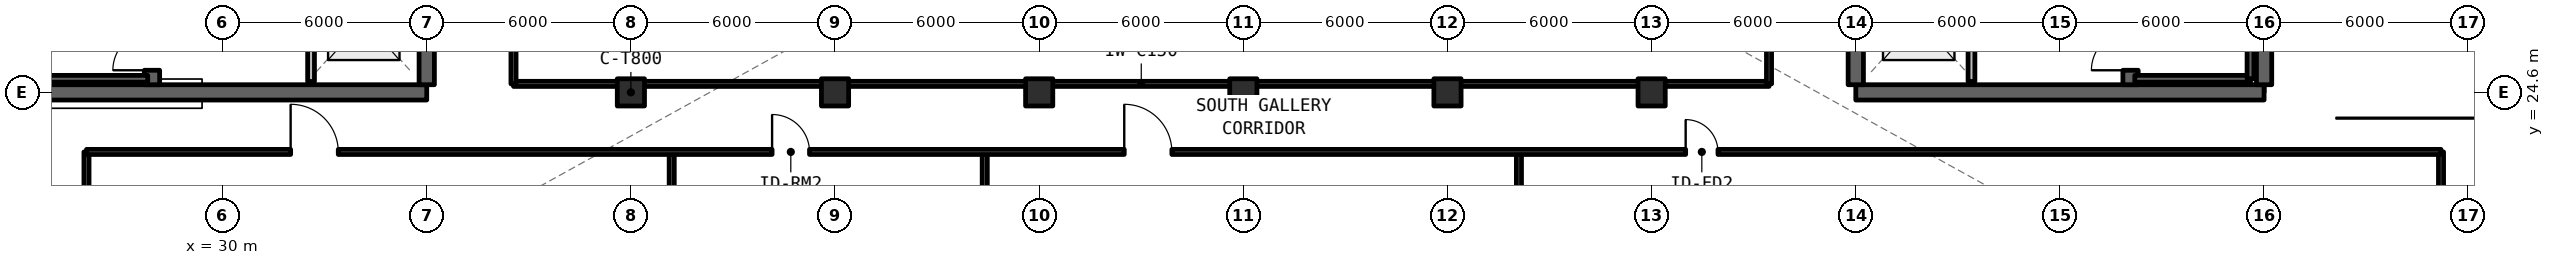
"""IFC4 building model, lengths in metres.
Left out: names, types, materials, properties, quantities, classifications, styles, units other than length and angle.
Written with IfcOpenShell. Run it as: python <this file> out.ifc"""

import sys

from ifc_helpers import new_model, si_unit, direction, frame, frame_2d, origin, origin_2d, place, context, subcontext, project, spatial, rectangle, extrude, element, fill, save


model = new_model("IFC4")
c1 = context("Model", 3, precision=1e-05, world=origin(), true_north=direction((0.0, 1.0)))
c2 = subcontext(c1, "Body", "Model", "MODEL_VIEW")
j1 = project(units=[si_unit("LENGTHUNIT", "METRE"), si_unit("PLANEANGLEUNIT", "RADIAN")], contexts=[c1])
p1 = place(None, origin())
s1 = spatial("IfcSite", under=j1, at=p1, CompositionType="ELEMENT")
p2 = place(p1, origin())
s2 = spatial("IfcBuilding", under=s1, at=p2, CompositionType="ELEMENT")
p3 = place(p2, frame((0.0, 0.0, 177.87)))
s3 = spatial("IfcBuildingStorey", under=s2, at=p3, CompositionType="ELEMENT", Elevation=177.87)
p4 = place(p3, frame((24.0, 24.6, 0.0), z_axis=(0.0, 0.0, 1.0), x_axis=(1.0, 0.0, 0.0)))
e1 = element("IfcWall", 1, at=p4, inside=s3, PredefinedType="SHEAR", context=c2, shape_type="SweptSolid", body=[
    extrude(rectangle(XDim=12.0, YDim=0.45, at=frame_2d((6.0, 0.0))), origin(), (0.0, 0.0, 1.0), 3.96),
])
p5 = place(p3, frame((36.0, 24.825, 0.0), z_axis=(0.0, 0.0, 1.0), x_axis=(0.0, 1.0, 0.0)))
e2 = element("IfcWall", 2, at=p5, inside=s3, PredefinedType="SHEAR", context=c2, shape_type="SweptSolid", body=[
    extrude(rectangle(XDim=8.975, YDim=0.45, at=frame_2d((4.488, 0.0))), origin(), (0.0, 0.0, 1.0), 3.96),
])
p6 = place(p3, frame((27.925, 24.825, 0.0), z_axis=(0.0, 0.0, 1.0), x_axis=(0.0, 1.0, 0.0)))
e3 = element("IfcWall", 3, at=p6, inside=s3, PredefinedType="SHEAR", context=c2, shape_type="SweptSolid", body=[
    extrude(rectangle(XDim=17.55, YDim=0.45, at=frame_2d((8.775, 0.0))), origin(), (0.0, 0.0, 1.0), 3.96),
])
p7 = place(p6, frame((0.425, 0.0, 0.0)))
e4 = element("IfcOpeningElement", 4, at=p7, cuts=e3, PredefinedType="OPENING", context=c2, shape_type="SweptSolid", body=[
    extrude(rectangle(XDim=1.15, YDim=2.15, at=frame_2d((0.575, 1.075))), frame((0.0, 0.235, 0.0), z_axis=(0.0, -1.0, 0.0), x_axis=(1.0, 0.0, 0.0)), (0.0, 0.0, 1.0), 0.47),
])
p8 = place(p6, frame((9.625, 0.0, 0.0)))
e5 = element("IfcOpeningElement", 5, at=p8, cuts=e3, PredefinedType="OPENING", context=c2, shape_type="SweptSolid", body=[
    extrude(rectangle(XDim=1.15, YDim=2.15, at=frame_2d((0.575, 1.075))), frame((0.0, 0.235, 0.0), z_axis=(0.0, -1.0, 0.0), x_axis=(1.0, 0.0, 0.0)), (0.0, 0.0, 1.0), 0.47),
])
p9 = place(p3, frame((78.0, 24.6, 0.0), z_axis=(0.0, 0.0, 1.0), x_axis=(1.0, 0.0, 0.0)))
e6 = element("IfcWall", 6, at=p9, inside=s3, PredefinedType="SHEAR", context=c2, shape_type="SweptSolid", body=[
    extrude(rectangle(XDim=12.0, YDim=0.45, at=frame_2d((6.0, 0.0))), origin(), (0.0, 0.0, 1.0), 3.96),
])
p10 = place(p3, frame((90.0, 24.825, 0.0), z_axis=(0.0, 0.0, 1.0), x_axis=(0.0, 1.0, 0.0)))
e7 = element("IfcWall", 7, at=p10, inside=s3, PredefinedType="SHEAR", context=c2, shape_type="SweptSolid", body=[
    extrude(rectangle(XDim=17.55, YDim=0.45, at=frame_2d((8.775, 0.0))), origin(), (0.0, 0.0, 1.0), 3.96),
])
p11 = place(p3, frame((78.0, 24.825, 0.0), z_axis=(0.0, 0.0, 1.0), x_axis=(0.0, 1.0, 0.0)))
e8 = element("IfcWall", 8, at=p11, inside=s3, PredefinedType="SHEAR", context=c2, shape_type="SweptSolid", body=[
    extrude(rectangle(XDim=8.975, YDim=0.45, at=frame_2d((4.488, 0.0))), origin(), (0.0, 0.0, 1.0), 3.96),
])
p12 = place(p3, frame((86.075, 24.825, 0.0), z_axis=(0.0, 0.0, 1.0), x_axis=(0.0, 1.0, 0.0)))
e9 = element("IfcWall", 9, at=p12, inside=s3, PredefinedType="SHEAR", context=c2, shape_type="SweptSolid", body=[
    extrude(rectangle(XDim=17.55, YDim=0.45, at=frame_2d((8.775, 0.0))), origin(), (0.0, 0.0, 1.0), 3.96),
])
p13 = place(p12, frame((0.425, 0.0, 0.0)))
e10 = element("IfcOpeningElement", 10, at=p13, cuts=e9, PredefinedType="OPENING", context=c2, shape_type="SweptSolid", body=[
    extrude(rectangle(XDim=1.15, YDim=2.15, at=frame_2d((0.575, 1.075))), frame((0.0, 0.235, 0.0), z_axis=(0.0, -1.0, 0.0), x_axis=(1.0, 0.0, 0.0)), (0.0, 0.0, 1.0), 0.47),
])
p14 = place(p12, frame((9.625, 0.0, 0.0)))
e11 = element("IfcOpeningElement", 11, at=p14, cuts=e9, PredefinedType="OPENING", context=c2, shape_type="SweptSolid", body=[
    extrude(rectangle(XDim=1.15, YDim=2.15, at=frame_2d((0.575, 1.075))), frame((0.0, 0.235, 0.0), z_axis=(0.0, -1.0, 0.0), x_axis=(1.0, 0.0, 0.0)), (0.0, 0.0, 1.0), 0.47),
])
for number, where, z_axis, x_axis in (
    (12, (42.0, 24.6, 0.0), (0.0, 0.0, 1.0), (1.0, 0.0, 0.0)),
    (13, (48.0, 24.6, 0.0), (0.0, 0.0, 1.0), (1.0, 0.0, 0.0)),
    (14, (54.0, 24.6, 0.0), (0.0, 0.0, 1.0), (1.0, 0.0, 0.0)),
    (15, (60.0, 24.6, 0.0), (0.0, 0.0, 1.0), (1.0, 0.0, 0.0)),
    (16, (66.0, 24.6, 0.0), (0.0, 0.0, 1.0), (1.0, 0.0, 0.0)),
    (17, (72.0, 24.6, 0.0), (0.0, 0.0, 1.0), (1.0, 0.0, 0.0)),
):
    element("IfcColumn", number, at=place(p3, frame(where, z_axis=z_axis, x_axis=x_axis)), inside=s3, PredefinedType="COLUMN", context=c2, shape_type="SweptSolid", body=[
        extrude(rectangle(XDim=0.8, YDim=0.8, at=origin_2d()), origin(), (0.0, 0.0, 1.0), 3.96),
    ])
p15 = place(p3, frame((32.6, 24.92, 0.0), z_axis=(0.0, 0.0, 1.0), x_axis=(0.0, 1.0, 0.0)))
e18 = element("IfcWall", 18, at=p15, inside=s3, PredefinedType="SOLIDWALL", context=c2, shape_type="SweptSolid", body=[
    extrude(rectangle(XDim=3.58, YDim=0.2, at=frame_2d((1.79, 0.0))), origin(), (0.0, 0.0, 1.0), 2.96),
])
p16 = place(p15, frame((1.3, 0.0, 0.0)))
e19 = element("IfcOpeningElement", 19, at=p16, cuts=e18, PredefinedType="OPENING", context=c2, shape_type="SweptSolid", body=[
    extrude(rectangle(XDim=1.1, YDim=2.2, at=frame_2d((0.55, 1.1))), frame((0.0, 0.11, 0.0), z_axis=(0.0, -1.0, 0.0), x_axis=(1.0, 0.0, 0.0)), (0.0, 0.0, 1.0), 0.22),
])
p17 = place(p3, frame((81.4, 24.92, 0.0), z_axis=(0.0, 0.0, 1.0), x_axis=(0.0, 1.0, 0.0)))
e20 = element("IfcWall", 20, at=p17, inside=s3, PredefinedType="SOLIDWALL", context=c2, shape_type="SweptSolid", body=[
    extrude(rectangle(XDim=3.58, YDim=0.2, at=frame_2d((1.79, 0.0))), origin(), (0.0, 0.0, 1.0), 2.96),
])
p18 = place(p17, frame((1.3, 0.0, 0.0)))
e21 = element("IfcOpeningElement", 21, at=p18, cuts=e20, PredefinedType="OPENING", context=c2, shape_type="SweptSolid", body=[
    extrude(rectangle(XDim=1.1, YDim=2.2, at=frame_2d((0.55, 1.1))), frame((0.0, 0.11, 0.0), z_axis=(0.0, -1.0, 0.0), x_axis=(1.0, 0.0, 0.0)), (0.0, 0.0, 1.0), 0.22),
])
p19 = place(p3, frame((38.55, 24.85, 0.0), z_axis=(0.0, 0.0, 1.0), x_axis=(1.0, 0.0, 0.0)))
e22 = element("IfcWall", 22, at=p19, inside=s3, PredefinedType="SOLIDWALL", context=c2, shape_type="SweptSolid", body=[
    extrude(rectangle(XDim=36.9, YDim=0.15, at=frame_2d((18.45, 0.0))), origin(), (0.0, 0.0, 1.0), 2.96),
])
p20 = place(p3, frame((38.55, 24.85, 0.0), z_axis=(0.0, 0.0, 1.0), x_axis=(0.0, 1.0, 0.0)))
e23 = element("IfcWall", 23, at=p20, inside=s3, PredefinedType="SOLIDWALL", context=c2, shape_type="SweptSolid", body=[
    extrude(rectangle(XDim=17.5, YDim=0.15, at=frame_2d((8.75, 0.0))), origin(), (0.0, 0.0, 1.0), 2.96),
])
p21 = place(p20, frame((7.8, 0.0, 0.0)))
e24 = element("IfcOpeningElement", 24, at=p21, cuts=e23, PredefinedType="OPENING", context=c2, shape_type="SweptSolid", body=[
    extrude(rectangle(XDim=1.4, YDim=2.15, at=frame_2d((0.7, 1.075))), frame((0.0, 0.085, 0.0), z_axis=(0.0, -1.0, 0.0), x_axis=(1.0, 0.0, 0.0)), (0.0, 0.0, 1.0), 0.17),
])
p22 = place(p3, frame((75.45, 24.85, 0.0), z_axis=(0.0, 0.0, 1.0), x_axis=(0.0, 1.0, 0.0)))
e25 = element("IfcWall", 25, at=p22, inside=s3, PredefinedType="SOLIDWALL", context=c2, shape_type="SweptSolid", body=[
    extrude(rectangle(XDim=17.5, YDim=0.15, at=frame_2d((8.75, 0.0))), origin(), (0.0, 0.0, 1.0), 2.96),
])
p23 = place(p3, frame((26.0, 12.15, 0.0), z_axis=(0.0, 0.0, 1.0), x_axis=(0.0, 1.0, 0.0)))
e26 = element("IfcWall", 26, at=p23, inside=s3, PredefinedType="SOLIDWALL", context=c2, shape_type="SweptSolid", body=[
    extrude(rectangle(XDim=10.7, YDim=0.15, at=frame_2d((5.35, 0.0))), origin(), (0.0, 0.0, 1.0), 2.96),
])
for number, where, z_axis, x_axis in (
    (27, (43.2, 12.15, 0.0), (0.0, 0.0, 1.0), (0.0, 1.0, 0.0)),
    (28, (52.4, 12.15, 0.0), (0.0, 0.0, 1.0), (0.0, 1.0, 0.0)),
    (29, (68.1, 12.15, 0.0), (0.0, 0.0, 1.0), (0.0, 1.0, 0.0)),
):
    element("IfcWall", number, at=place(p3, frame(where, z_axis=z_axis, x_axis=x_axis)), inside=s3, PredefinedType="PARTITIONING", context=c2, shape_type="SweptSolid", body=[
        extrude(rectangle(XDim=10.7, YDim=0.15, at=frame_2d((5.35, 0.0))), origin(), (0.0, 0.0, 1.0), 2.96),
    ])
p24 = place(p3, frame((95.2, 12.15, 0.0), z_axis=(0.0, 0.0, 1.0), x_axis=(0.0, 1.0, 0.0)))
e30 = element("IfcWall", 30, at=p24, inside=s3, PredefinedType="SOLIDWALL", context=c2, shape_type="SweptSolid", body=[
    extrude(rectangle(XDim=10.7, YDim=0.15, at=frame_2d((5.35, 0.0))), origin(), (0.0, 0.0, 1.0), 2.96),
])
p25 = place(p3, frame((26.0, 22.85, 0.0), z_axis=(0.0, 0.0, 1.0), x_axis=(1.0, 0.0, 0.0)))
e31 = element("IfcWall", 31, at=p25, inside=s3, PredefinedType="SOLIDWALL", context=c2, shape_type="SweptSolid", body=[
    extrude(rectangle(XDim=69.2, YDim=0.15, at=frame_2d((34.6, 0.0))), origin(), (0.0, 0.0, 1.0), 2.96),
])
p26 = place(p25, frame((6.0, 0.0, 0.0)))
e32 = element("IfcOpeningElement", 32, at=p26, cuts=e31, PredefinedType="OPENING", context=c2, shape_type="SweptSolid", body=[
    extrude(rectangle(XDim=1.4, YDim=2.15, at=frame_2d((0.7, 1.075))), frame((0.0, 0.085, 0.0), z_axis=(0.0, -1.0, 0.0), x_axis=(1.0, 0.0, 0.0)), (0.0, 0.0, 1.0), 0.17),
])
p27 = place(p25, frame((20.15, 0.0, 0.0)))
e33 = element("IfcOpeningElement", 33, at=p27, cuts=e31, PredefinedType="OPENING", context=c2, shape_type="SweptSolid", body=[
    extrude(rectangle(XDim=1.1, YDim=2.15, at=frame_2d((0.55, 1.075))), frame((0.0, 0.085, 0.0), z_axis=(0.0, -1.0, 0.0), x_axis=(1.0, 0.0, 0.0)), (0.0, 0.0, 1.0), 0.17),
])
p28 = place(p25, frame((30.5, 0.0, 0.0)))
e34 = element("IfcOpeningElement", 34, at=p28, cuts=e31, PredefinedType="OPENING", context=c2, shape_type="SweptSolid", body=[
    extrude(rectangle(XDim=1.4, YDim=2.15, at=frame_2d((0.7, 1.075))), frame((0.0, 0.085, 0.0), z_axis=(0.0, -1.0, 0.0), x_axis=(1.0, 0.0, 0.0)), (0.0, 0.0, 1.0), 0.17),
])
p29 = place(p25, frame((47.0, 0.0, 0.0)))
e35 = element("IfcOpeningElement", 35, at=p29, cuts=e31, PredefinedType="OPENING", context=c2, shape_type="SweptSolid", body=[
    extrude(rectangle(XDim=0.95, YDim=2.15, at=frame_2d((0.475, 1.075))), frame((0.0, 0.085, 0.0), z_axis=(0.0, -1.0, 0.0), x_axis=(1.0, 0.0, 0.0)), (0.0, 0.0, 1.0), 0.17),
])
for number, where, z_axis, x_axis in (
    (36, (24.4, 25.0, 0.0), (0.0, 0.0, 1.0), (1.0, 0.0, 0.0)),
    (37, (86.2, 25.0, 0.0), (0.0, 0.0, 1.0), (1.0, 0.0, 0.0)),
):
    element("IfcWall", number, at=place(p3, frame(where, z_axis=z_axis, x_axis=x_axis)), inside=s3, PredefinedType="SOLIDWALL", context=c2, shape_type="SweptSolid", body=[
        extrude(rectangle(XDim=3.4, YDim=0.2, at=frame_2d((1.7, 0.0))), origin(), (0.0, 0.0, 1.0), 3.96),
    ])
p30 = place(p3, frame((89.6, 25.0, 0.0), z_axis=(0.0, 0.0, 1.0), x_axis=(0.0, 1.0, 0.0)))
e38 = element("IfcWall", 38, at=p30, inside=s3, PredefinedType="SOLIDWALL", context=c2, shape_type="SweptSolid", body=[
    extrude(rectangle(XDim=8.0, YDim=0.2, at=frame_2d((4.0, 0.0))), origin(), (0.0, 0.0, 1.0), 3.96),
])
p31 = place(p26, origin())
e39 = element("IfcDoor", 39, at=p31, inside=s3, OperationType="SINGLE_SWING_RIGHT", PredefinedType="DOOR", context=c2, shape_type="SweptSolid", body=[
    extrude(rectangle(XDim=1.4, YDim=2.15, at=frame_2d((0.7, 1.075))), frame((0.0, 0.025, 0.0), z_axis=(0.0, -1.0, 0.0), x_axis=(1.0, 0.0, 0.0)), (0.0, 0.0, 1.0), 0.05),
])
fill(e32, e39)
p32 = place(p27, origin())
e40 = element("IfcDoor", 40, at=p32, inside=s3, OperationType="SINGLE_SWING_LEFT", PredefinedType="DOOR", context=c2, shape_type="SweptSolid", body=[
    extrude(rectangle(XDim=1.1, YDim=2.15, at=frame_2d((0.55, 1.075))), frame((0.0, 0.025, 0.0), z_axis=(0.0, -1.0, 0.0), x_axis=(1.0, 0.0, 0.0)), (0.0, 0.0, 1.0), 0.05),
])
fill(e33, e40)
p33 = place(p28, origin())
e41 = element("IfcDoor", 41, at=p33, inside=s3, OperationType="SINGLE_SWING_RIGHT", PredefinedType="DOOR", context=c2, shape_type="SweptSolid", body=[
    extrude(rectangle(XDim=1.4, YDim=2.15, at=frame_2d((0.7, 1.075))), frame((0.0, 0.025, 0.0), z_axis=(0.0, -1.0, 0.0), x_axis=(1.0, 0.0, 0.0)), (0.0, 0.0, 1.0), 0.05),
])
fill(e34, e41)
p34 = place(p29, origin())
e42 = element("IfcDoor", 42, at=p34, inside=s3, OperationType="SINGLE_SWING_LEFT", PredefinedType="DOOR", context=c2, shape_type="SweptSolid", body=[
    extrude(rectangle(XDim=0.95, YDim=2.15, at=frame_2d((0.475, 1.075))), frame((0.0, 0.025, 0.0), z_axis=(0.0, -1.0, 0.0), x_axis=(1.0, 0.0, 0.0)), (0.0, 0.0, 1.0), 0.05),
])
fill(e35, e42)
p35 = place(p7, origin())
e43 = element("IfcDoor", 43, at=p35, inside=s3, OperationType="SINGLE_SWING_LEFT", PredefinedType="DOOR", context=c2, shape_type="SweptSolid", body=[
    extrude(rectangle(XDim=1.15, YDim=2.15, at=frame_2d((0.575, 1.075))), frame((0.0, 0.025, 0.0), z_axis=(0.0, -1.0, 0.0), x_axis=(1.0, 0.0, 0.0)), (0.0, 0.0, 1.0), 0.05),
])
fill(e4, e43)
p36 = place(p13, origin())
e44 = element("IfcDoor", 44, at=p36, inside=s3, OperationType="SINGLE_SWING_LEFT", PredefinedType="DOOR", context=c2, shape_type="SweptSolid", body=[
    extrude(rectangle(XDim=1.15, YDim=2.15, at=frame_2d((0.575, 1.075))), frame((0.0, 0.025, 0.0), z_axis=(0.0, -1.0, 0.0), x_axis=(1.0, 0.0, 0.0)), (0.0, 0.0, 1.0), 0.05),
])
fill(e10, e44)
save(model, sys.argv[1])
